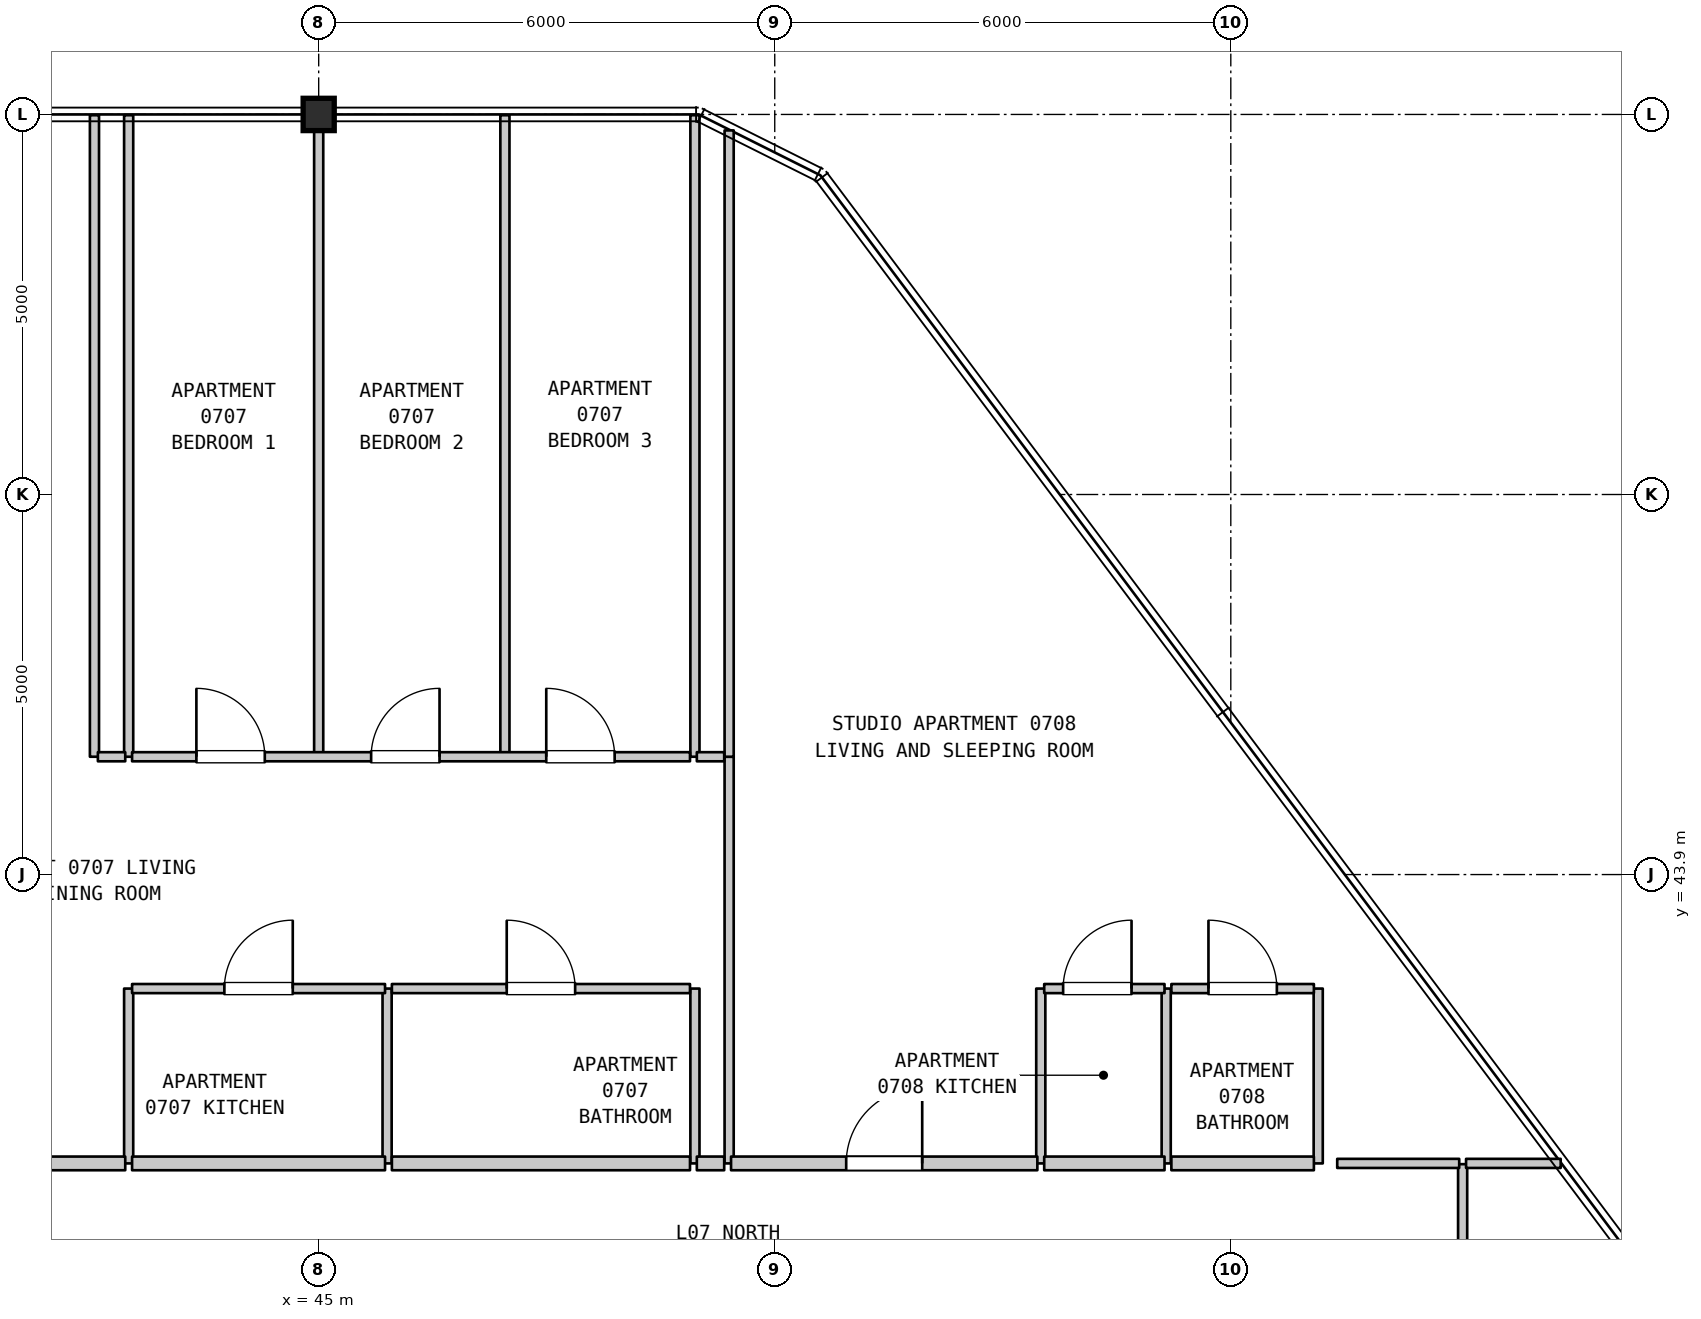
"""IFC4 building model, lengths in metres.
Left out: names, types, materials, properties, quantities, classifications, styles, units other than length and angle.
Written with IfcOpenShell. Run it as: python <this file> out.ifc"""

import sys

from ifc_helpers import new_model, si_unit, direction, frame, frame_2d, origin, origin_2d, place, context, subcontext, project, spatial, rectangle, i_section, extrude, element, fill, save


model = new_model("IFC4")
c1 = context("Model", 3, precision=1e-05, world=origin(), true_north=direction((0.0, 1.0)))
c2 = subcontext(c1, "Body", "Model", "MODEL_VIEW")
j1 = project(units=[si_unit("LENGTHUNIT", "METRE"), si_unit("PLANEANGLEUNIT", "RADIAN")], contexts=[c1])
p1 = place(None, origin())
s1 = spatial("IfcSite", under=j1, at=p1, CompositionType="ELEMENT")
p2 = place(p1, origin())
s2 = spatial("IfcBuilding", under=s1, at=p2, CompositionType="ELEMENT")
p3 = place(p2, frame((0.0, 0.0, 35.1)))
s3 = spatial("IfcBuildingStorey", under=s2, at=p3, CompositionType="ELEMENT", Elevation=35.1)
p4 = place(p3, frame((45.0, 53.9, 0.0), z_axis=(0.0, 0.0, 1.0), x_axis=(1.0, 0.0, 0.0)))
e1 = element("IfcColumn", 1, at=p4, inside=s3, PredefinedType="COLUMN", context=c2, shape_type="SweptSolid", body=[
    extrude(i_section(OverallWidth=0.409, OverallDepth=0.425, WebThickness=0.032, FlangeThickness=0.052, FilletRadius=0.015, at=origin_2d()), origin(), (0.0, 0.0, 1.0), 3.7),
])
p5 = place(p3, frame((42.05, 45.45, 0.0), z_axis=(0.0, 0.0, 1.0), x_axis=(0.0, 1.0, 0.0)))
e2 = element("IfcWall", 2, at=p5, inside=s3, PredefinedType="PARTITIONING", context=c2, shape_type="SweptSolid", body=[
    extrude(rectangle(XDim=8.44, YDim=0.12, at=frame_2d((4.22, 0.0))), origin(), (0.0, 0.0, 1.0), 3.385),
])
p6 = place(p3, frame((42.5, 40.1, 0.0), z_axis=(0.0, 0.0, 1.0), x_axis=(0.0, 1.0, 0.0)))
e3 = element("IfcWall", 3, at=p6, inside=s3, PredefinedType="PARTITIONING", context=c2, shape_type="SweptSolid", body=[
    extrude(rectangle(XDim=2.3, YDim=0.12, at=frame_2d((1.15, 0.0))), origin(), (0.0, 0.0, 1.0), 3.385),
])
for number, where, z_axis, x_axis in (
    (4, (42.5, 45.45, 0.0), (0.0, 0.0, 1.0), (0.0, 1.0, 0.0)),
    (5, (45.0, 45.45, 0.0), (0.0, 0.0, 1.0), (0.0, 1.0, 0.0)),
):
    element("IfcWall", number, at=place(p3, frame(where, z_axis=z_axis, x_axis=x_axis)), inside=s3, PredefinedType="PARTITIONING", context=c2, shape_type="SweptSolid", body=[
        extrude(rectangle(XDim=8.44, YDim=0.12, at=frame_2d((4.22, 0.0))), origin(), (0.0, 0.0, 1.0), 3.385),
    ])
p7 = place(p3, frame((45.9, 40.1, 0.0), z_axis=(0.0, 0.0, 1.0), x_axis=(0.0, 1.0, 0.0)))
e6 = element("IfcWall", 6, at=p7, inside=s3, PredefinedType="PARTITIONING", context=c2, shape_type="SweptSolid", body=[
    extrude(rectangle(XDim=2.3, YDim=0.12, at=frame_2d((1.15, 0.0))), origin(), (0.0, 0.0, 1.0), 3.385),
])
p8 = place(p3, frame((47.45, 45.45, 0.0), z_axis=(0.0, 0.0, 1.0), x_axis=(0.0, 1.0, 0.0)))
e7 = element("IfcWall", 7, at=p8, inside=s3, PredefinedType="PARTITIONING", context=c2, shape_type="SweptSolid", body=[
    extrude(rectangle(XDim=8.44, YDim=0.12, at=frame_2d((4.22, 0.0))), origin(), (0.0, 0.0, 1.0), 3.385),
])
p9 = place(p3, frame((49.95, 40.1, 0.0), z_axis=(0.0, 0.0, 1.0), x_axis=(0.0, 1.0, 0.0)))
e8 = element("IfcWall", 8, at=p9, inside=s3, PredefinedType="PARTITIONING", context=c2, shape_type="SweptSolid", body=[
    extrude(rectangle(XDim=2.3, YDim=0.12, at=frame_2d((1.15, 0.0))), origin(), (0.0, 0.0, 1.0), 3.385),
])
p10 = place(p3, frame((49.95, 45.45, 0.0), z_axis=(0.0, 0.0, 1.0), x_axis=(0.0, 1.0, 0.0)))
e9 = element("IfcWall", 9, at=p10, inside=s3, PredefinedType="PARTITIONING", context=c2, shape_type="SweptSolid", body=[
    extrude(rectangle(XDim=8.44, YDim=0.12, at=frame_2d((4.22, 0.0))), origin(), (0.0, 0.0, 1.0), 3.385),
])
p11 = place(p3, frame((50.4, 40.1, 0.0), z_axis=(0.0, 0.0, 1.0), x_axis=(0.0, 1.0, 0.0)))
e10 = element("IfcWall", 10, at=p11, inside=s3, PredefinedType="PARTITIONING", context=c2, shape_type="SweptSolid", body=[
    extrude(rectangle(XDim=5.35, YDim=0.12, at=frame_2d((2.675, 0.0))), origin(), (0.0, 0.0, 1.0), 3.385),
])
p12 = place(p3, frame((50.4, 45.45, 0.0), z_axis=(0.0, 0.0, 1.0), x_axis=(0.0, 1.0, 0.0)))
e11 = element("IfcWall", 11, at=p12, inside=s3, PredefinedType="PARTITIONING", context=c2, shape_type="SweptSolid", body=[
    extrude(rectangle(XDim=8.24, YDim=0.12, at=frame_2d((4.12, 0.0))), origin(), (0.0, 0.0, 1.0), 3.385),
])
for number, where, z_axis, x_axis in (
    (12, (54.5, 40.1, 0.0), (0.0, 0.0, 1.0), (0.0, 1.0, 0.0)),
    (13, (56.15, 40.1, 0.0), (0.0, 0.0, 1.0), (0.0, 1.0, 0.0)),
    (14, (58.15, 40.1, 0.0), (0.0, 0.0, 1.0), (0.0, 1.0, 0.0)),
):
    element("IfcWall", number, at=place(p3, frame(where, z_axis=z_axis, x_axis=x_axis)), inside=s3, PredefinedType="PARTITIONING", context=c2, shape_type="SweptSolid", body=[
        extrude(rectangle(XDim=2.3, YDim=0.12, at=frame_2d((1.15, 0.0))), origin(), (0.0, 0.0, 1.0), 3.385),
    ])
p13 = place(p3, frame((60.05, 37.89, 0.0), z_axis=(0.0, 0.0, 1.0), x_axis=(0.0, 1.0, 0.0)))
e15 = element("IfcWall", 15, at=p13, inside=s3, PredefinedType="PARTITIONING", context=c2, shape_type="SweptSolid", body=[
    extrude(rectangle(XDim=2.2, YDim=0.12, at=frame_2d((1.1, 0.0))), origin(), (0.0, 0.0, 1.0), 3.385),
])
p14 = place(p3, frame((37.155, 40.1, 0.0), z_axis=(0.0, 0.0, 1.0), x_axis=(1.0, 0.0, 0.0)))
e16 = element("IfcWall", 16, at=p14, inside=s3, PredefinedType="STANDARD", context=c2, shape_type="SweptSolid", body=[
    extrude(rectangle(XDim=5.3, YDim=0.18, at=frame_2d((2.65, 0.0))), origin(), (0.0, 0.0, 1.0), 3.385),
])
p15 = place(p14, frame((2.15, 0.0, 0.0)))
e17 = element("IfcOpeningElement", 17, at=p15, cuts=e16, PredefinedType="OPENING", context=c2, shape_type="SweptSolid", body=[
    extrude(rectangle(XDim=1.0, YDim=2.15, at=frame_2d((0.5, 1.075))), frame((0.0, 0.1, 0.0), z_axis=(0.0, -1.0, 0.0), x_axis=(1.0, 0.0, 0.0)), (0.0, 0.0, 1.0), 0.2),
])
p16 = place(p3, frame((42.545, 40.1, 0.0), z_axis=(0.0, 0.0, 1.0), x_axis=(1.0, 0.0, 0.0)))
e18 = element("IfcWall", 18, at=p16, inside=s3, PredefinedType="STANDARD", context=c2, shape_type="SweptSolid", body=[
    extrude(rectangle(XDim=3.328, YDim=0.18, at=frame_2d((1.664, 0.0))), origin(), (0.0, 0.0, 1.0), 3.385),
])
p17 = place(p3, frame((45.963, 40.1, 0.0), z_axis=(0.0, 0.0, 1.0), x_axis=(1.0, 0.0, 0.0)))
e19 = element("IfcWall", 19, at=p17, inside=s3, PredefinedType="STANDARD", context=c2, shape_type="SweptSolid", body=[
    extrude(rectangle(XDim=3.922, YDim=0.18, at=frame_2d((1.961, 0.0))), origin(), (0.0, 0.0, 1.0), 3.385),
])
p18 = place(p3, frame((49.975, 40.1, 0.0), z_axis=(0.0, 0.0, 1.0), x_axis=(1.0, 0.0, 0.0)))
e20 = element("IfcWall", 20, at=p18, inside=s3, PredefinedType="STANDARD", context=c2, shape_type="SweptSolid", body=[
    extrude(rectangle(XDim=0.36, YDim=0.18, at=frame_2d((0.18, 0.0))), origin(), (0.0, 0.0, 1.0), 3.385),
])
p19 = place(p3, frame((50.425, 40.1, 0.0), z_axis=(0.0, 0.0, 1.0), x_axis=(1.0, 0.0, 0.0)))
e21 = element("IfcWall", 21, at=p19, inside=s3, PredefinedType="STANDARD", context=c2, shape_type="SweptSolid", body=[
    extrude(rectangle(XDim=4.03, YDim=0.18, at=frame_2d((2.015, 0.0))), origin(), (0.0, 0.0, 1.0), 3.385),
])
p20 = place(p19, frame((1.515, 0.0, 0.0)))
e22 = element("IfcOpeningElement", 22, at=p20, cuts=e21, PredefinedType="OPENING", context=c2, shape_type="SweptSolid", body=[
    extrude(rectangle(XDim=1.0, YDim=2.15, at=frame_2d((0.5, 1.075))), frame((0.0, 0.1, 0.0), z_axis=(0.0, -1.0, 0.0), x_axis=(1.0, 0.0, 0.0)), (0.0, 0.0, 1.0), 0.2),
])
p21 = place(p3, frame((54.545, 40.1, 0.0), z_axis=(0.0, 0.0, 1.0), x_axis=(1.0, 0.0, 0.0)))
e23 = element("IfcWall", 23, at=p21, inside=s3, PredefinedType="STANDARD", context=c2, shape_type="SweptSolid", body=[
    extrude(rectangle(XDim=1.583, YDim=0.18, at=frame_2d((0.792, 0.0))), origin(), (0.0, 0.0, 1.0), 3.385),
])
p22 = place(p3, frame((56.218, 40.1, 0.0), z_axis=(0.0, 0.0, 1.0), x_axis=(1.0, 0.0, 0.0)))
e24 = element("IfcWall", 24, at=p22, inside=s3, PredefinedType="STANDARD", context=c2, shape_type="SweptSolid", body=[
    extrude(rectangle(XDim=1.875, YDim=0.18, at=frame_2d((0.938, 0.0))), origin(), (0.0, 0.0, 1.0), 3.385),
])
p23 = place(p3, frame((58.4, 40.1, 0.0), z_axis=(0.0, 0.0, 1.0), x_axis=(1.0, 0.0, 0.0)))
e25 = element("IfcWall", 25, at=p23, inside=s3, PredefinedType="PARTITIONING", context=c2, shape_type="SweptSolid", body=[
    extrude(rectangle(XDim=1.605, YDim=0.12, at=frame_2d((0.802, 0.0))), origin(), (0.0, 0.0, 1.0), 3.385),
])
p24 = place(p3, frame((60.095, 40.1, 0.0), z_axis=(0.0, 0.0, 1.0), x_axis=(1.0, 0.0, 0.0)))
e26 = element("IfcWall", 26, at=p24, inside=s3, PredefinedType="PARTITIONING", context=c2, shape_type="SweptSolid", body=[
    extrude(rectangle(XDim=1.245, YDim=0.12, at=frame_2d((0.623, 0.0))), origin(), (0.0, 0.0, 1.0), 3.385),
])
p25 = place(p3, frame((42.545, 42.4, 0.0), z_axis=(0.0, 0.0, 1.0), x_axis=(1.0, 0.0, 0.0)))
e27 = element("IfcWall", 27, at=p25, inside=s3, PredefinedType="PARTITIONING", context=c2, shape_type="SweptSolid", body=[
    extrude(rectangle(XDim=3.328, YDim=0.12, at=frame_2d((1.664, 0.0))), origin(), (0.0, 0.0, 1.0), 3.385),
])
p26 = place(p25, frame((1.214, 0.0, 0.0)))
e28 = element("IfcOpeningElement", 28, at=p26, cuts=e27, PredefinedType="OPENING", context=c2, shape_type="SweptSolid", body=[
    extrude(rectangle(XDim=0.9, YDim=2.15, at=frame_2d((0.45, 1.075))), frame((0.0, 0.07, 0.0), z_axis=(0.0, -1.0, 0.0), x_axis=(1.0, 0.0, 0.0)), (0.0, 0.0, 1.0), 0.14),
])
p27 = place(p3, frame((45.963, 42.4, 0.0), z_axis=(0.0, 0.0, 1.0), x_axis=(1.0, 0.0, 0.0)))
e29 = element("IfcWall", 29, at=p27, inside=s3, PredefinedType="PARTITIONING", context=c2, shape_type="SweptSolid", body=[
    extrude(rectangle(XDim=3.922, YDim=0.12, at=frame_2d((1.961, 0.0))), origin(), (0.0, 0.0, 1.0), 3.385),
])
p28 = place(p27, frame((1.511, 0.0, 0.0)))
e30 = element("IfcOpeningElement", 30, at=p28, cuts=e29, PredefinedType="OPENING", context=c2, shape_type="SweptSolid", body=[
    extrude(rectangle(XDim=0.9, YDim=2.1, at=frame_2d((0.45, 1.05))), frame((0.0, 0.07, 0.0), z_axis=(0.0, -1.0, 0.0), x_axis=(1.0, 0.0, 0.0)), (0.0, 0.0, 1.0), 0.14),
])
p29 = place(p3, frame((54.545, 42.4, 0.0), z_axis=(0.0, 0.0, 1.0), x_axis=(1.0, 0.0, 0.0)))
e31 = element("IfcWall", 31, at=p29, inside=s3, PredefinedType="PARTITIONING", context=c2, shape_type="SweptSolid", body=[
    extrude(rectangle(XDim=1.583, YDim=0.12, at=frame_2d((0.792, 0.0))), origin(), (0.0, 0.0, 1.0), 3.385),
])
p30 = place(p29, frame((0.249, 0.0, 0.0)))
e32 = element("IfcOpeningElement", 32, at=p30, cuts=e31, PredefinedType="OPENING", context=c2, shape_type="SweptSolid", body=[
    extrude(rectangle(XDim=0.9, YDim=2.15, at=frame_2d((0.45, 1.075))), frame((0.0, 0.07, 0.0), z_axis=(0.0, -1.0, 0.0), x_axis=(1.0, 0.0, 0.0)), (0.0, 0.0, 1.0), 0.14),
])
p31 = place(p3, frame((56.218, 42.4, 0.0), z_axis=(0.0, 0.0, 1.0), x_axis=(1.0, 0.0, 0.0)))
e33 = element("IfcWall", 33, at=p31, inside=s3, PredefinedType="PARTITIONING", context=c2, shape_type="SweptSolid", body=[
    extrude(rectangle(XDim=1.875, YDim=0.12, at=frame_2d((0.938, 0.0))), origin(), (0.0, 0.0, 1.0), 3.385),
])
p32 = place(p31, frame((0.488, 0.0, 0.0)))
e34 = element("IfcOpeningElement", 34, at=p32, cuts=e33, PredefinedType="OPENING", context=c2, shape_type="SweptSolid", body=[
    extrude(rectangle(XDim=0.9, YDim=2.1, at=frame_2d((0.45, 1.05))), frame((0.0, 0.07, 0.0), z_axis=(0.0, -1.0, 0.0), x_axis=(1.0, 0.0, 0.0)), (0.0, 0.0, 1.0), 0.14),
])
p33 = place(p3, frame((42.095, 45.45, 0.0), z_axis=(0.0, 0.0, 1.0), x_axis=(1.0, 0.0, 0.0)))
e35 = element("IfcWall", 35, at=p33, inside=s3, PredefinedType="PARTITIONING", context=c2, shape_type="SweptSolid", body=[
    extrude(rectangle(XDim=0.36, YDim=0.12, at=frame_2d((0.18, 0.0))), origin(), (0.0, 0.0, 1.0), 3.385),
])
p34 = place(p3, frame((42.545, 45.45, 0.0), z_axis=(0.0, 0.0, 1.0), x_axis=(1.0, 0.0, 0.0)))
e36 = element("IfcWall", 36, at=p34, inside=s3, PredefinedType="PARTITIONING", context=c2, shape_type="SweptSolid", body=[
    extrude(rectangle(XDim=7.34, YDim=0.12, at=frame_2d((3.67, 0.0))), origin(), (0.0, 0.0, 1.0), 3.385),
])
p35 = place(p34, frame((0.846, 0.0, 0.0)))
e37 = element("IfcOpeningElement", 37, at=p35, cuts=e36, PredefinedType="OPENING", context=c2, shape_type="SweptSolid", body=[
    extrude(rectangle(XDim=0.9, YDim=2.15, at=frame_2d((0.45, 1.075))), frame((0.0, 0.07, 0.0), z_axis=(0.0, -1.0, 0.0), x_axis=(1.0, 0.0, 0.0)), (0.0, 0.0, 1.0), 0.14),
])
p36 = place(p34, frame((3.145, 0.0, 0.0)))
e38 = element("IfcOpeningElement", 38, at=p36, cuts=e36, PredefinedType="OPENING", context=c2, shape_type="SweptSolid", body=[
    extrude(rectangle(XDim=0.9, YDim=2.15, at=frame_2d((0.45, 1.075))), frame((0.0, 0.07, 0.0), z_axis=(0.0, -1.0, 0.0), x_axis=(1.0, 0.0, 0.0)), (0.0, 0.0, 1.0), 0.14),
])
p37 = place(p34, frame((5.449, 0.0, 0.0)))
e39 = element("IfcOpeningElement", 39, at=p37, cuts=e36, PredefinedType="OPENING", context=c2, shape_type="SweptSolid", body=[
    extrude(rectangle(XDim=0.9, YDim=2.15, at=frame_2d((0.45, 1.075))), frame((0.0, 0.07, 0.0), z_axis=(0.0, -1.0, 0.0), x_axis=(1.0, 0.0, 0.0)), (0.0, 0.0, 1.0), 0.14),
])
p38 = place(p3, frame((49.975, 45.45, 0.0), z_axis=(0.0, 0.0, 1.0), x_axis=(1.0, 0.0, 0.0)))
e40 = element("IfcWall", 40, at=p38, inside=s3, PredefinedType="PARTITIONING", context=c2, shape_type="SweptSolid", body=[
    extrude(rectangle(XDim=0.36, YDim=0.12, at=frame_2d((0.18, 0.0))), origin(), (0.0, 0.0, 1.0), 3.385),
])
p39 = place(p20, origin())
e41 = element("IfcDoor", 41, at=p39, inside=s3, OperationType="SINGLE_SWING_RIGHT", PredefinedType="DOOR", context=c2, shape_type="SweptSolid", body=[
    extrude(rectangle(XDim=1.0, YDim=2.15, at=frame_2d((0.5, 1.075))), frame((0.0, 0.025, 0.0), z_axis=(0.0, -1.0, 0.0), x_axis=(1.0, 0.0, 0.0)), (0.0, 0.0, 1.0), 0.05),
])
fill(e22, e41)
p40 = place(p26, origin())
e42 = element("IfcDoor", 42, at=p40, inside=s3, OperationType="SINGLE_SWING_RIGHT", PredefinedType="DOOR", context=c2, shape_type="SweptSolid", body=[
    extrude(rectangle(XDim=0.9, YDim=2.15, at=frame_2d((0.45, 1.075))), frame((0.0, 0.025, 0.0), z_axis=(0.0, -1.0, 0.0), x_axis=(1.0, 0.0, 0.0)), (0.0, 0.0, 1.0), 0.05),
])
fill(e28, e42)
p41 = place(p28, origin())
e43 = element("IfcDoor", 43, at=p41, inside=s3, OperationType="SINGLE_SWING_LEFT", PredefinedType="DOOR", context=c2, shape_type="SweptSolid", body=[
    extrude(rectangle(XDim=0.9, YDim=2.1, at=frame_2d((0.45, 1.05))), frame((0.0, 0.025, 0.0), z_axis=(0.0, -1.0, 0.0), x_axis=(1.0, 0.0, 0.0)), (0.0, 0.0, 1.0), 0.05),
])
fill(e30, e43)
p42 = place(p30, origin())
e44 = element("IfcDoor", 44, at=p42, inside=s3, OperationType="SINGLE_SWING_RIGHT", PredefinedType="DOOR", context=c2, shape_type="SweptSolid", body=[
    extrude(rectangle(XDim=0.9, YDim=2.15, at=frame_2d((0.45, 1.075))), frame((0.0, 0.025, 0.0), z_axis=(0.0, -1.0, 0.0), x_axis=(1.0, 0.0, 0.0)), (0.0, 0.0, 1.0), 0.05),
])
fill(e32, e44)
p43 = place(p32, origin())
e45 = element("IfcDoor", 45, at=p43, inside=s3, OperationType="SINGLE_SWING_LEFT", PredefinedType="DOOR", context=c2, shape_type="SweptSolid", body=[
    extrude(rectangle(XDim=0.9, YDim=2.1, at=frame_2d((0.45, 1.05))), frame((0.0, 0.025, 0.0), z_axis=(0.0, -1.0, 0.0), x_axis=(1.0, 0.0, 0.0)), (0.0, 0.0, 1.0), 0.05),
])
fill(e34, e45)
p44 = place(p35, origin())
e46 = element("IfcDoor", 46, at=p44, inside=s3, OperationType="SINGLE_SWING_LEFT", PredefinedType="DOOR", context=c2, shape_type="SweptSolid", body=[
    extrude(rectangle(XDim=0.9, YDim=2.15, at=frame_2d((0.45, 1.075))), frame((0.0, 0.025, 0.0), z_axis=(0.0, -1.0, 0.0), x_axis=(1.0, 0.0, 0.0)), (0.0, 0.0, 1.0), 0.05),
])
fill(e37, e46)
p45 = place(p36, origin())
e47 = element("IfcDoor", 47, at=p45, inside=s3, OperationType="SINGLE_SWING_RIGHT", PredefinedType="DOOR", context=c2, shape_type="SweptSolid", body=[
    extrude(rectangle(XDim=0.9, YDim=2.15, at=frame_2d((0.45, 1.075))), frame((0.0, 0.025, 0.0), z_axis=(0.0, -1.0, 0.0), x_axis=(1.0, 0.0, 0.0)), (0.0, 0.0, 1.0), 0.05),
])
fill(e38, e47)
p46 = place(p37, origin())
e48 = element("IfcDoor", 48, at=p46, inside=s3, OperationType="SINGLE_SWING_LEFT", PredefinedType="DOOR", context=c2, shape_type="SweptSolid", body=[
    extrude(rectangle(XDim=0.9, YDim=2.15, at=frame_2d((0.45, 1.075))), frame((0.0, 0.025, 0.0), z_axis=(0.0, -1.0, 0.0), x_axis=(1.0, 0.0, 0.0)), (0.0, 0.0, 1.0), 0.05),
])
fill(e39, e48)
save(model, sys.argv[1])
